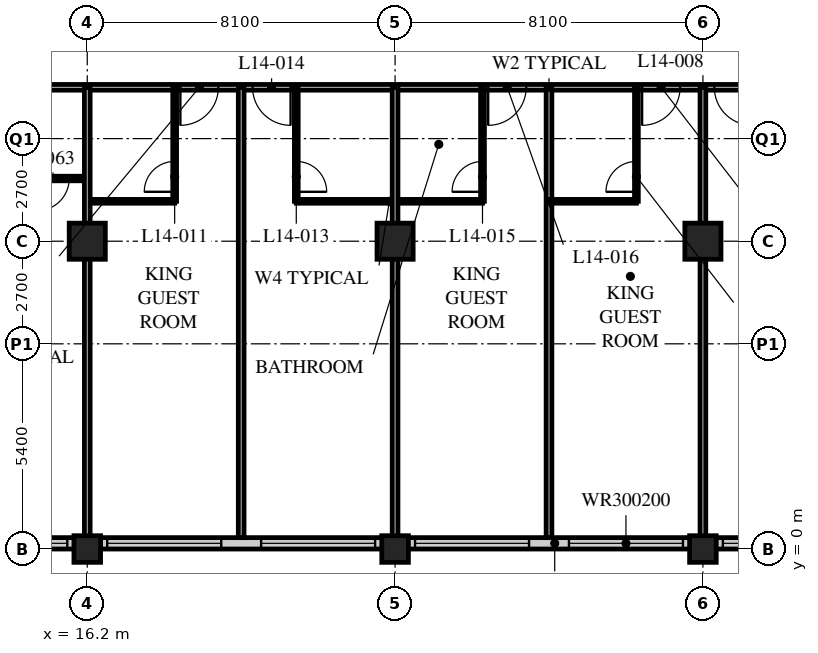
"""IFC4 building model, lengths in metres.
Left out: names, types, materials, properties, quantities, classifications, styles, units other than length and angle.
Written with IfcOpenShell. Run it as: python <this file> out.ifc"""

import sys

from ifc_helpers import new_model, si_unit, direction, frame, frame_2d, origin, origin_2d, place, context, subcontext, project, spatial, rectangle, hollow_rectangle, extrude, element, fill, save


model = new_model("IFC4")
c1 = context("Model", 3, precision=1e-05, world=origin(), true_north=direction((0.0, 1.0)))
c2 = subcontext(c1, "Body", "Model", "MODEL_VIEW")
j1 = project(units=[si_unit("LENGTHUNIT", "METRE"), si_unit("PLANEANGLEUNIT", "RADIAN")], contexts=[c1])
p1 = place(None, origin())
s1 = spatial("IfcSite", under=j1, at=p1, CompositionType="ELEMENT")
p2 = place(p1, origin())
s2 = spatial("IfcBuilding", under=s1, at=p2, CompositionType="ELEMENT")
p3 = place(p2, frame((0.0, 0.0, 60.2)))
s3 = spatial("IfcBuildingStorey", under=s2, at=p3, CompositionType="ELEMENT", Elevation=60.2)
p4 = place(p3, frame((16.2, 0.0, 0.0), z_axis=(0.0, 0.0, 1.0), x_axis=(1.0, 0.0, 0.0)))
e1 = element("IfcColumn", 1, at=p4, inside=s3, PredefinedType="COLUMN", context=c2, shape_type="SweptSolid", body=[
    extrude(hollow_rectangle(XDim=0.7, YDim=0.7, WallThickness=0.06, at=origin_2d()), origin(), (0.0, 0.0, 1.0), 3.4),
])
p5 = place(p3, frame((16.2, 8.1, 0.0), z_axis=(0.0, 0.0, 1.0), x_axis=(1.0, 0.0, 0.0)))
e2 = element("IfcColumn", 2, at=p5, inside=s3, PredefinedType="COLUMN", context=c2, shape_type="SweptSolid", body=[
    extrude(hollow_rectangle(XDim=0.95, YDim=0.95, WallThickness=0.095, at=origin_2d()), origin(), (0.0, 0.0, 1.0), 3.4),
])
p6 = place(p3, frame((24.3, 0.0, 0.0), z_axis=(0.0, 0.0, 1.0), x_axis=(1.0, 0.0, 0.0)))
e3 = element("IfcColumn", 3, at=p6, inside=s3, PredefinedType="COLUMN", context=c2, shape_type="SweptSolid", body=[
    extrude(hollow_rectangle(XDim=0.7, YDim=0.7, WallThickness=0.06, at=origin_2d()), origin(), (0.0, 0.0, 1.0), 3.4),
])
p7 = place(p3, frame((24.3, 8.1, 0.0), z_axis=(0.0, 0.0, 1.0), x_axis=(1.0, 0.0, 0.0)))
e4 = element("IfcColumn", 4, at=p7, inside=s3, PredefinedType="COLUMN", context=c2, shape_type="SweptSolid", body=[
    extrude(hollow_rectangle(XDim=0.95, YDim=0.95, WallThickness=0.095, at=origin_2d()), origin(), (0.0, 0.0, 1.0), 3.4),
])
p8 = place(p3, frame((32.4, 0.0, 0.0), z_axis=(0.0, 0.0, 1.0), x_axis=(1.0, 0.0, 0.0)))
e5 = element("IfcColumn", 5, at=p8, inside=s3, PredefinedType="COLUMN", context=c2, shape_type="SweptSolid", body=[
    extrude(hollow_rectangle(XDim=0.7, YDim=0.7, WallThickness=0.06, at=origin_2d()), origin(), (0.0, 0.0, 1.0), 3.4),
])
p9 = place(p3, frame((32.4, 8.1, 0.0), z_axis=(0.0, 0.0, 1.0), x_axis=(1.0, 0.0, 0.0)))
e6 = element("IfcColumn", 6, at=p9, inside=s3, PredefinedType="COLUMN", context=c2, shape_type="SweptSolid", body=[
    extrude(hollow_rectangle(XDim=0.95, YDim=0.95, WallThickness=0.095, at=origin_2d()), origin(), (0.0, 0.0, 1.0), 3.4),
])
p10 = place(p3, frame((8.4, 0.15, 0.0), z_axis=(0.0, 0.0, 1.0), x_axis=(1.0, 0.0, 0.0)))
e7 = element("IfcWall", 7, at=p10, inside=s3, PredefinedType="SOLIDWALL", context=c2, shape_type="SweptSolid", body=[
    extrude(rectangle(XDim=40.2, YDim=0.3, at=frame_2d((20.1, 0.0))), origin(), (0.0, 0.0, 1.0), 3.19),
])
p11 = place(p10, frame((0.225, 0.0, 0.9)))
e8 = element("IfcOpeningElement", 8, at=p11, cuts=e7, PredefinedType="OPENING", context=c2, shape_type="SweptSolid", body=[
    extrude(rectangle(XDim=3.0, YDim=2.0, at=frame_2d((1.5, 1.0))), frame((0.0, 0.16, 0.0), z_axis=(0.0, -1.0, 0.0), x_axis=(1.0, 0.0, 0.0)), (0.0, 0.0, 1.0), 0.32),
])
p12 = place(p10, frame((4.275, 0.0, 0.9)))
e9 = element("IfcOpeningElement", 9, at=p12, cuts=e7, PredefinedType="OPENING", context=c2, shape_type="SweptSolid", body=[
    extrude(rectangle(XDim=3.0, YDim=2.0, at=frame_2d((1.5, 1.0))), frame((0.0, 0.16, 0.0), z_axis=(0.0, -1.0, 0.0), x_axis=(1.0, 0.0, 0.0)), (0.0, 0.0, 1.0), 0.32),
])
p13 = place(p10, frame((8.325, 0.0, 0.9)))
e10 = element("IfcOpeningElement", 10, at=p13, cuts=e7, PredefinedType="OPENING", context=c2, shape_type="SweptSolid", body=[
    extrude(rectangle(XDim=3.0, YDim=2.0, at=frame_2d((1.5, 1.0))), frame((0.0, 0.16, 0.0), z_axis=(0.0, -1.0, 0.0), x_axis=(1.0, 0.0, 0.0)), (0.0, 0.0, 1.0), 0.32),
])
p14 = place(p10, frame((12.375, 0.0, 0.9)))
e11 = element("IfcOpeningElement", 11, at=p14, cuts=e7, PredefinedType="OPENING", context=c2, shape_type="SweptSolid", body=[
    extrude(rectangle(XDim=3.0, YDim=2.0, at=frame_2d((1.5, 1.0))), frame((0.0, 0.16, 0.0), z_axis=(0.0, -1.0, 0.0), x_axis=(1.0, 0.0, 0.0)), (0.0, 0.0, 1.0), 0.32),
])
p15 = place(p10, frame((16.425, 0.0, 0.9)))
e12 = element("IfcOpeningElement", 12, at=p15, cuts=e7, PredefinedType="OPENING", context=c2, shape_type="SweptSolid", body=[
    extrude(rectangle(XDim=3.0, YDim=2.0, at=frame_2d((1.5, 1.0))), frame((0.0, 0.16, 0.0), z_axis=(0.0, -1.0, 0.0), x_axis=(1.0, 0.0, 0.0)), (0.0, 0.0, 1.0), 0.32),
])
p16 = place(p10, frame((20.475, 0.0, 0.9)))
e13 = element("IfcOpeningElement", 13, at=p16, cuts=e7, PredefinedType="OPENING", context=c2, shape_type="SweptSolid", body=[
    extrude(rectangle(XDim=3.0, YDim=2.0, at=frame_2d((1.5, 1.0))), frame((0.0, 0.16, 0.0), z_axis=(0.0, -1.0, 0.0), x_axis=(1.0, 0.0, 0.0)), (0.0, 0.0, 1.0), 0.32),
])
p17 = place(p10, frame((24.525, 0.0, 0.9)))
e14 = element("IfcOpeningElement", 14, at=p17, cuts=e7, PredefinedType="OPENING", context=c2, shape_type="SweptSolid", body=[
    extrude(rectangle(XDim=3.0, YDim=2.0, at=frame_2d((1.5, 1.0))), frame((0.0, 0.16, 0.0), z_axis=(0.0, -1.0, 0.0), x_axis=(1.0, 0.0, 0.0)), (0.0, 0.0, 1.0), 0.32),
])
p18 = place(p10, frame((28.575, 0.0, 0.9)))
e15 = element("IfcOpeningElement", 15, at=p18, cuts=e7, PredefinedType="OPENING", context=c2, shape_type="SweptSolid", body=[
    extrude(rectangle(XDim=3.0, YDim=2.0, at=frame_2d((1.5, 1.0))), frame((0.0, 0.16, 0.0), z_axis=(0.0, -1.0, 0.0), x_axis=(1.0, 0.0, 0.0)), (0.0, 0.0, 1.0), 0.32),
])
p19 = place(p10, frame((32.625, 0.0, 0.9)))
e16 = element("IfcOpeningElement", 16, at=p19, cuts=e7, PredefinedType="OPENING", context=c2, shape_type="SweptSolid", body=[
    extrude(rectangle(XDim=3.0, YDim=2.0, at=frame_2d((1.5, 1.0))), frame((0.0, 0.16, 0.0), z_axis=(0.0, -1.0, 0.0), x_axis=(1.0, 0.0, 0.0)), (0.0, 0.0, 1.0), 0.32),
])
p20 = place(p10, frame((36.675, 0.0, 0.9)))
e17 = element("IfcOpeningElement", 17, at=p20, cuts=e7, PredefinedType="OPENING", context=c2, shape_type="SweptSolid", body=[
    extrude(rectangle(XDim=3.0, YDim=2.0, at=frame_2d((1.5, 1.0))), frame((0.0, 0.16, 0.0), z_axis=(0.0, -1.0, 0.0), x_axis=(1.0, 0.0, 0.0)), (0.0, 0.0, 1.0), 0.32),
])
p21 = place(p3, frame((12.15, 12.15, 0.0), z_axis=(0.0, 0.0, 1.0), x_axis=(1.0, 0.0, 0.0)))
e18 = element("IfcWall", 18, at=p21, inside=s3, PredefinedType="PARTITIONING", context=c2, shape_type="SweptSolid", body=[
    extrude(rectangle(XDim=32.4, YDim=0.15, at=frame_2d((16.2, 0.0))), origin(), (0.0, 0.0, 1.0), 3.19),
])
p22 = place(p21, frame((6.5, 0.0, 0.0)))
e19 = element("IfcOpeningElement", 19, at=p22, cuts=e18, PredefinedType="OPENING", context=c2, shape_type="SweptSolid", body=[
    extrude(rectangle(XDim=1.0, YDim=2.1, at=frame_2d((0.5, 1.05))), frame((0.0, 0.085, 0.0), z_axis=(0.0, -1.0, 0.0), x_axis=(1.0, 0.0, 0.0)), (0.0, 0.0, 1.0), 0.17),
])
p23 = place(p21, frame((8.4, 0.0, 0.0)))
e20 = element("IfcOpeningElement", 20, at=p23, cuts=e18, PredefinedType="OPENING", context=c2, shape_type="SweptSolid", body=[
    extrude(rectangle(XDim=1.0, YDim=2.1, at=frame_2d((0.5, 1.05))), frame((0.0, 0.085, 0.0), z_axis=(0.0, -1.0, 0.0), x_axis=(1.0, 0.0, 0.0)), (0.0, 0.0, 1.0), 0.17),
])
p24 = place(p21, frame((14.6, 0.0, 0.0)))
e21 = element("IfcOpeningElement", 21, at=p24, cuts=e18, PredefinedType="OPENING", context=c2, shape_type="SweptSolid", body=[
    extrude(rectangle(XDim=1.0, YDim=2.1, at=frame_2d((0.5, 1.05))), frame((0.0, 0.085, 0.0), z_axis=(0.0, -1.0, 0.0), x_axis=(1.0, 0.0, 0.0)), (0.0, 0.0, 1.0), 0.17),
])
p25 = place(p21, frame((18.65, 0.0, 0.0)))
e22 = element("IfcOpeningElement", 22, at=p25, cuts=e18, PredefinedType="OPENING", context=c2, shape_type="SweptSolid", body=[
    extrude(rectangle(XDim=1.0, YDim=2.1, at=frame_2d((0.5, 1.05))), frame((0.0, 0.085, 0.0), z_axis=(0.0, -1.0, 0.0), x_axis=(1.0, 0.0, 0.0)), (0.0, 0.0, 1.0), 0.17),
])
p26 = place(p21, frame((20.55, 0.0, 0.0)))
e23 = element("IfcOpeningElement", 23, at=p26, cuts=e18, PredefinedType="OPENING", context=c2, shape_type="SweptSolid", body=[
    extrude(rectangle(XDim=1.0, YDim=2.1, at=frame_2d((0.5, 1.05))), frame((0.0, 0.085, 0.0), z_axis=(0.0, -1.0, 0.0), x_axis=(1.0, 0.0, 0.0)), (0.0, 0.0, 1.0), 0.17),
])
p27 = place(p21, frame((26.75, 0.0, 0.0)))
e24 = element("IfcOpeningElement", 24, at=p27, cuts=e18, PredefinedType="OPENING", context=c2, shape_type="SweptSolid", body=[
    extrude(rectangle(XDim=1.0, YDim=2.1, at=frame_2d((0.5, 1.05))), frame((0.0, 0.085, 0.0), z_axis=(0.0, -1.0, 0.0), x_axis=(1.0, 0.0, 0.0)), (0.0, 0.0, 1.0), 0.17),
])
p28 = place(p21, frame((1.525, 0.0, 0.0)))
e25 = element("IfcOpeningElement", 25, at=p28, cuts=e18, PredefinedType="OPENING", context=c2, shape_type="SweptSolid", body=[
    extrude(rectangle(XDim=1.0, YDim=2.1, at=frame_2d((0.5, 1.05))), frame((0.0, 0.085, 0.0), z_axis=(0.0, -1.0, 0.0), x_axis=(1.0, 0.0, 0.0)), (0.0, 0.0, 1.0), 0.17),
])
p29 = place(p21, frame((29.875, 0.0, 0.0)))
e26 = element("IfcOpeningElement", 26, at=p29, cuts=e18, PredefinedType="OPENING", context=c2, shape_type="SweptSolid", body=[
    extrude(rectangle(XDim=1.0, YDim=2.1, at=frame_2d((0.5, 1.05))), frame((0.0, 0.085, 0.0), z_axis=(0.0, -1.0, 0.0), x_axis=(1.0, 0.0, 0.0)), (0.0, 0.0, 1.0), 0.17),
])
p30 = place(p3, frame((16.2, 9.15, 0.0), z_axis=(0.0, 0.0, 1.0), x_axis=(1.0, 0.0, 0.0)))
e27 = element("IfcWall", 27, at=p30, inside=s3, PredefinedType="PARTITIONING", context=c2, shape_type="SweptSolid", body=[
    extrude(rectangle(XDim=2.3, YDim=0.1, at=frame_2d((1.15, 0.0))), origin(), (0.0, 0.0, 1.0), 3.19),
])
p31 = place(p3, frame((18.5, 12.15, 0.0), z_axis=(0.0, 0.0, 1.0), x_axis=(0.0, -1.0, 0.0)))
e28 = element("IfcWall", 28, at=p31, inside=s3, PredefinedType="PARTITIONING", context=c2, shape_type="SweptSolid", body=[
    extrude(rectangle(XDim=3.0, YDim=0.1, at=frame_2d((1.5, 0.0))), origin(), (0.0, 0.0, 1.0), 3.19),
])
p32 = place(p31, frame((1.95, 0.0, 0.0)))
e29 = element("IfcOpeningElement", 29, at=p32, cuts=e28, PredefinedType="OPENING", context=c2, shape_type="SweptSolid", body=[
    extrude(rectangle(XDim=0.8, YDim=2.1, at=frame_2d((0.4, 1.05))), frame((0.0, 0.06, 0.0), z_axis=(0.0, -1.0, 0.0), x_axis=(1.0, 0.0, 0.0)), (0.0, 0.0, 1.0), 0.12),
])
p33 = place(p3, frame((20.25, 12.15, 0.0), z_axis=(0.0, 0.0, 1.0), x_axis=(0.0, -1.0, 0.0)))
e30 = element("IfcWall", 30, at=p33, inside=s3, PredefinedType="PARTITIONING", context=c2, shape_type="SweptSolid", body=[
    extrude(rectangle(XDim=11.85, YDim=0.15, at=frame_2d((5.925, 0.0))), origin(), (0.0, 0.0, 1.0), 3.19),
])
p34 = place(p3, frame((21.7, 9.15, 0.0), z_axis=(0.0, 0.0, 1.0), x_axis=(1.0, 0.0, 0.0)))
e31 = element("IfcWall", 31, at=p34, inside=s3, PredefinedType="PARTITIONING", context=c2, shape_type="SweptSolid", body=[
    extrude(rectangle(XDim=4.9, YDim=0.1, at=frame_2d((2.45, 0.0))), origin(), (0.0, 0.0, 1.0), 3.19),
])
p35 = place(p3, frame((21.7, 12.15, 0.0), z_axis=(0.0, 0.0, 1.0), x_axis=(0.0, -1.0, 0.0)))
e32 = element("IfcWall", 32, at=p35, inside=s3, PredefinedType="PARTITIONING", context=c2, shape_type="SweptSolid", body=[
    extrude(rectangle(XDim=3.0, YDim=0.1, at=frame_2d((1.5, 0.0))), origin(), (0.0, 0.0, 1.0), 3.19),
])
p36 = place(p35, frame((1.95, 0.0, 0.0)))
e33 = element("IfcOpeningElement", 33, at=p36, cuts=e32, PredefinedType="OPENING", context=c2, shape_type="SweptSolid", body=[
    extrude(rectangle(XDim=0.8, YDim=2.1, at=frame_2d((0.4, 1.05))), frame((0.0, 0.06, 0.0), z_axis=(0.0, -1.0, 0.0), x_axis=(1.0, 0.0, 0.0)), (0.0, 0.0, 1.0), 0.12),
])
p37 = place(p3, frame((24.3, 12.15, 0.0), z_axis=(0.0, 0.0, 1.0), x_axis=(0.0, -1.0, 0.0)))
e34 = element("IfcWall", 34, at=p37, inside=s3, PredefinedType="PARTITIONING", context=c2, shape_type="SweptSolid", body=[
    extrude(rectangle(XDim=11.85, YDim=0.15, at=frame_2d((5.925, 0.0))), origin(), (0.0, 0.0, 1.0), 2.578),
])
p38 = place(p3, frame((26.6, 12.15, 0.0), z_axis=(0.0, 0.0, 1.0), x_axis=(0.0, -1.0, 0.0)))
e35 = element("IfcWall", 35, at=p38, inside=s3, PredefinedType="PARTITIONING", context=c2, shape_type="SweptSolid", body=[
    extrude(rectangle(XDim=3.0, YDim=0.1, at=frame_2d((1.5, 0.0))), origin(), (0.0, 0.0, 1.0), 3.19),
])
p39 = place(p38, frame((1.95, 0.0, 0.0)))
e36 = element("IfcOpeningElement", 36, at=p39, cuts=e35, PredefinedType="OPENING", context=c2, shape_type="SweptSolid", body=[
    extrude(rectangle(XDim=0.8, YDim=2.1, at=frame_2d((0.4, 1.05))), frame((0.0, 0.06, 0.0), z_axis=(0.0, -1.0, 0.0), x_axis=(1.0, 0.0, 0.0)), (0.0, 0.0, 1.0), 0.12),
])
p40 = place(p3, frame((28.35, 12.15, 0.0), z_axis=(0.0, 0.0, 1.0), x_axis=(0.0, -1.0, 0.0)))
e37 = element("IfcWall", 37, at=p40, inside=s3, PredefinedType="PARTITIONING", context=c2, shape_type="SweptSolid", body=[
    extrude(rectangle(XDim=11.85, YDim=0.15, at=frame_2d((5.925, 0.0))), origin(), (0.0, 0.0, 1.0), 3.19),
])
p41 = place(p3, frame((28.35, 9.15, 0.0), z_axis=(0.0, 0.0, 1.0), x_axis=(1.0, 0.0, 0.0)))
e38 = element("IfcWall", 38, at=p41, inside=s3, PredefinedType="PARTITIONING", context=c2, shape_type="SweptSolid", body=[
    extrude(rectangle(XDim=2.3, YDim=0.1, at=frame_2d((1.15, 0.0))), origin(), (0.0, 0.0, 1.0), 3.19),
])
p42 = place(p3, frame((30.65, 12.15, 0.0), z_axis=(0.0, 0.0, 1.0), x_axis=(0.0, -1.0, 0.0)))
e39 = element("IfcWall", 39, at=p42, inside=s3, PredefinedType="PARTITIONING", context=c2, shape_type="SweptSolid", body=[
    extrude(rectangle(XDim=3.0, YDim=0.1, at=frame_2d((1.5, 0.0))), origin(), (0.0, 0.0, 1.0), 3.19),
])
p43 = place(p42, frame((1.95, 0.0, 0.0)))
e40 = element("IfcOpeningElement", 40, at=p43, cuts=e39, PredefinedType="OPENING", context=c2, shape_type="SweptSolid", body=[
    extrude(rectangle(XDim=0.8, YDim=2.1, at=frame_2d((0.4, 1.05))), frame((0.0, 0.06, 0.0), z_axis=(0.0, -1.0, 0.0), x_axis=(1.0, 0.0, 0.0)), (0.0, 0.0, 1.0), 0.12),
])
p44 = place(p3, frame((32.4, 12.15, 0.0), z_axis=(0.0, 0.0, 1.0), x_axis=(0.0, -1.0, 0.0)))
e41 = element("IfcWall", 41, at=p44, inside=s3, PredefinedType="PARTITIONING", context=c2, shape_type="SweptSolid", body=[
    extrude(rectangle(XDim=11.85, YDim=0.15, at=frame_2d((5.925, 0.0))), origin(), (0.0, 0.0, 1.0), 2.578),
])
p45 = place(p3, frame((8.15, 9.75, 0.0), z_axis=(0.0, 0.0, 1.0), x_axis=(1.0, 0.0, 0.0)))
e42 = element("IfcWall", 42, at=p45, inside=s3, PredefinedType="PARTITIONING", context=c2, shape_type="SweptSolid", body=[
    extrude(rectangle(XDim=8.05, YDim=0.12, at=frame_2d((4.025, 0.0))), origin(), (0.0, 0.0, 1.0), 3.19),
])
p46 = place(p45, frame((6.725, 0.0, 0.0)))
e43 = element("IfcOpeningElement", 43, at=p46, cuts=e42, PredefinedType="OPENING", context=c2, shape_type="SweptSolid", body=[
    extrude(rectangle(XDim=0.85, YDim=2.1, at=frame_2d((0.425, 1.05))), frame((0.0, 0.07, 0.0), z_axis=(0.0, -1.0, 0.0), x_axis=(1.0, 0.0, 0.0)), (0.0, 0.0, 1.0), 0.14),
])
p47 = place(p45, frame((2.875, 0.0, 0.0)))
e44 = element("IfcOpeningElement", 44, at=p47, cuts=e42, PredefinedType="OPENING", context=c2, shape_type="SweptSolid", body=[
    extrude(rectangle(XDim=0.85, YDim=2.1, at=frame_2d((0.425, 1.05))), frame((0.0, 0.07, 0.0), z_axis=(0.0, -1.0, 0.0), x_axis=(1.0, 0.0, 0.0)), (0.0, 0.0, 1.0), 0.14),
])
p48 = place(p3, frame((16.2, 12.15, 0.0), z_axis=(0.0, 0.0, 1.0), x_axis=(0.0, -1.0, 0.0)))
e45 = element("IfcWall", 45, at=p48, inside=s3, PredefinedType="PARTITIONING", context=c2, shape_type="SweptSolid", body=[
    extrude(rectangle(XDim=11.85, YDim=0.15, at=frame_2d((5.925, 0.0))), origin(), (0.0, 0.0, 1.0), 2.578),
])
p49 = place(p12, origin())
e46 = element("IfcWindow", 46, at=p49, inside=s3, PartitioningType="SINGLE_PANEL", PredefinedType="WINDOW", context=c2, shape_type="SweptSolid", body=[
    extrude(rectangle(XDim=3.0, YDim=2.0, at=frame_2d((1.5, 1.0))), frame((0.0, 0.03, 0.0), z_axis=(0.0, -1.0, 0.0), x_axis=(1.0, 0.0, 0.0)), (0.0, 0.0, 1.0), 0.06),
])
fill(e9, e46)
p50 = place(p13, origin())
e47 = element("IfcWindow", 47, at=p50, inside=s3, PartitioningType="SINGLE_PANEL", PredefinedType="WINDOW", context=c2, shape_type="SweptSolid", body=[
    extrude(rectangle(XDim=3.0, YDim=2.0, at=frame_2d((1.5, 1.0))), frame((0.0, 0.03, 0.0), z_axis=(0.0, -1.0, 0.0), x_axis=(1.0, 0.0, 0.0)), (0.0, 0.0, 1.0), 0.06),
])
fill(e10, e47)
p51 = place(p14, origin())
e48 = element("IfcWindow", 48, at=p51, inside=s3, PartitioningType="SINGLE_PANEL", PredefinedType="WINDOW", context=c2, shape_type="SweptSolid", body=[
    extrude(rectangle(XDim=3.0, YDim=2.0, at=frame_2d((1.5, 1.0))), frame((0.0, 0.03, 0.0), z_axis=(0.0, -1.0, 0.0), x_axis=(1.0, 0.0, 0.0)), (0.0, 0.0, 1.0), 0.06),
])
fill(e11, e48)
p52 = place(p15, origin())
e49 = element("IfcWindow", 49, at=p52, inside=s3, PartitioningType="SINGLE_PANEL", PredefinedType="WINDOW", context=c2, shape_type="SweptSolid", body=[
    extrude(rectangle(XDim=3.0, YDim=2.0, at=frame_2d((1.5, 1.0))), frame((0.0, 0.03, 0.0), z_axis=(0.0, -1.0, 0.0), x_axis=(1.0, 0.0, 0.0)), (0.0, 0.0, 1.0), 0.06),
])
fill(e12, e49)
p53 = place(p16, origin())
e50 = element("IfcWindow", 50, at=p53, inside=s3, PartitioningType="SINGLE_PANEL", PredefinedType="WINDOW", context=c2, shape_type="SweptSolid", body=[
    extrude(rectangle(XDim=3.0, YDim=2.0, at=frame_2d((1.5, 1.0))), frame((0.0, 0.03, 0.0), z_axis=(0.0, -1.0, 0.0), x_axis=(1.0, 0.0, 0.0)), (0.0, 0.0, 1.0), 0.06),
])
fill(e13, e50)
p54 = place(p17, origin())
e51 = element("IfcWindow", 51, at=p54, inside=s3, PartitioningType="SINGLE_PANEL", PredefinedType="WINDOW", context=c2, shape_type="SweptSolid", body=[
    extrude(rectangle(XDim=3.0, YDim=2.0, at=frame_2d((1.5, 1.0))), frame((0.0, 0.03, 0.0), z_axis=(0.0, -1.0, 0.0), x_axis=(1.0, 0.0, 0.0)), (0.0, 0.0, 1.0), 0.06),
])
fill(e14, e51)
p55 = place(p32, origin())
e52 = element("IfcDoor", 52, at=p55, inside=s3, OperationType="SINGLE_SWING_LEFT", PredefinedType="DOOR", context=c2, shape_type="SweptSolid", body=[
    extrude(rectangle(XDim=0.8, YDim=2.1, at=frame_2d((0.4, 1.05))), frame((0.0, 0.025, 0.0), z_axis=(0.0, -1.0, 0.0), x_axis=(1.0, 0.0, 0.0)), (0.0, 0.0, 1.0), 0.05),
])
fill(e29, e52)
p56 = place(p22, origin())
e53 = element("IfcDoor", 53, at=p56, inside=s3, OperationType="SINGLE_SWING_RIGHT", PredefinedType="DOOR", context=c2, shape_type="SweptSolid", body=[
    extrude(rectangle(XDim=1.0, YDim=2.1, at=frame_2d((0.5, 1.05))), frame((0.0, 0.025, 0.0), z_axis=(0.0, -1.0, 0.0), x_axis=(1.0, 0.0, 0.0)), (0.0, 0.0, 1.0), 0.05),
])
fill(e19, e53)
p57 = place(p36, origin())
e54 = element("IfcDoor", 54, at=p57, inside=s3, OperationType="SINGLE_SWING_RIGHT", PredefinedType="DOOR", context=c2, shape_type="SweptSolid", body=[
    extrude(rectangle(XDim=0.8, YDim=2.1, at=frame_2d((0.4, 1.05))), frame((0.0, 0.025, 0.0), z_axis=(0.0, -1.0, 0.0), x_axis=(1.0, 0.0, 0.0)), (0.0, 0.0, 1.0), 0.05),
])
fill(e33, e54)
p58 = place(p23, origin())
e55 = element("IfcDoor", 55, at=p58, inside=s3, OperationType="SINGLE_SWING_LEFT", PredefinedType="DOOR", context=c2, shape_type="SweptSolid", body=[
    extrude(rectangle(XDim=1.0, YDim=2.1, at=frame_2d((0.5, 1.05))), frame((0.0, 0.025, 0.0), z_axis=(0.0, -1.0, 0.0), x_axis=(1.0, 0.0, 0.0)), (0.0, 0.0, 1.0), 0.05),
])
fill(e20, e55)
p59 = place(p39, origin())
e56 = element("IfcDoor", 56, at=p59, inside=s3, OperationType="SINGLE_SWING_LEFT", PredefinedType="DOOR", context=c2, shape_type="SweptSolid", body=[
    extrude(rectangle(XDim=0.8, YDim=2.1, at=frame_2d((0.4, 1.05))), frame((0.0, 0.025, 0.0), z_axis=(0.0, -1.0, 0.0), x_axis=(1.0, 0.0, 0.0)), (0.0, 0.0, 1.0), 0.05),
])
fill(e36, e56)
p60 = place(p24, origin())
e57 = element("IfcDoor", 57, at=p60, inside=s3, OperationType="SINGLE_SWING_RIGHT", PredefinedType="DOOR", context=c2, shape_type="SweptSolid", body=[
    extrude(rectangle(XDim=1.0, YDim=2.1, at=frame_2d((0.5, 1.05))), frame((0.0, 0.025, 0.0), z_axis=(0.0, -1.0, 0.0), x_axis=(1.0, 0.0, 0.0)), (0.0, 0.0, 1.0), 0.05),
])
fill(e21, e57)
p61 = place(p43, origin())
e58 = element("IfcDoor", 58, at=p61, inside=s3, OperationType="SINGLE_SWING_LEFT", PredefinedType="DOOR", context=c2, shape_type="SweptSolid", body=[
    extrude(rectangle(XDim=0.8, YDim=2.1, at=frame_2d((0.4, 1.05))), frame((0.0, 0.025, 0.0), z_axis=(0.0, -1.0, 0.0), x_axis=(1.0, 0.0, 0.0)), (0.0, 0.0, 1.0), 0.05),
])
fill(e40, e58)
p62 = place(p25, origin())
e59 = element("IfcDoor", 59, at=p62, inside=s3, OperationType="SINGLE_SWING_RIGHT", PredefinedType="DOOR", context=c2, shape_type="SweptSolid", body=[
    extrude(rectangle(XDim=1.0, YDim=2.1, at=frame_2d((0.5, 1.05))), frame((0.0, 0.025, 0.0), z_axis=(0.0, -1.0, 0.0), x_axis=(1.0, 0.0, 0.0)), (0.0, 0.0, 1.0), 0.05),
])
fill(e22, e59)
p63 = place(p26, origin())
e60 = element("IfcDoor", 60, at=p63, inside=s3, OperationType="SINGLE_SWING_LEFT", PredefinedType="DOOR", context=c2, shape_type="SweptSolid", body=[
    extrude(rectangle(XDim=1.0, YDim=2.1, at=frame_2d((0.5, 1.05))), frame((0.0, 0.025, 0.0), z_axis=(0.0, -1.0, 0.0), x_axis=(1.0, 0.0, 0.0)), (0.0, 0.0, 1.0), 0.05),
])
fill(e23, e60)
p64 = place(p46, origin())
e61 = element("IfcDoor", 61, at=p64, inside=s3, OperationType="SINGLE_SWING_RIGHT", PredefinedType="DOOR", context=c2, shape_type="SweptSolid", body=[
    extrude(rectangle(XDim=0.85, YDim=2.1, at=frame_2d((0.425, 1.05))), frame((0.0, 0.025, 0.0), z_axis=(0.0, -1.0, 0.0), x_axis=(1.0, 0.0, 0.0)), (0.0, 0.0, 1.0), 0.05),
])
fill(e43, e61)
save(model, sys.argv[1])
